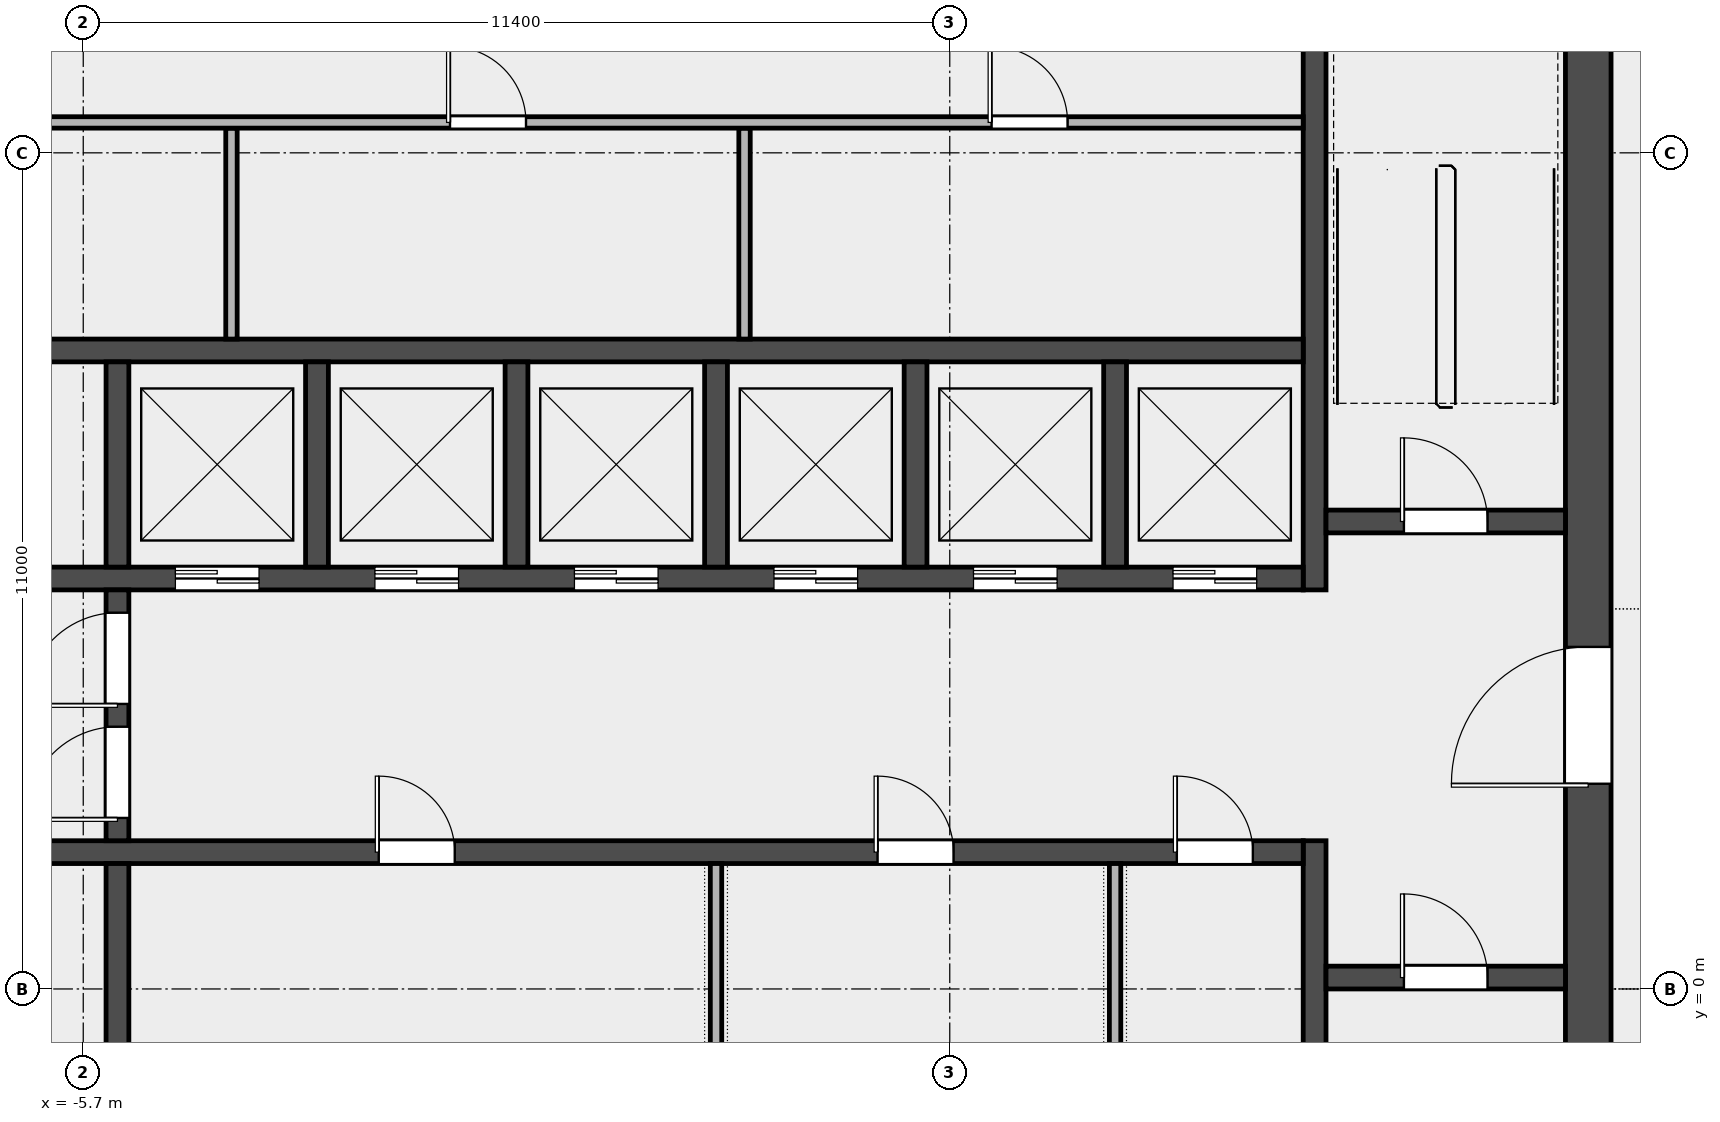
"""IFC4 building model, lengths in metres.
Left out: names, types, materials, properties, quantities, classifications, styles, units other than length and angle.
Written with IfcOpenShell. Run it as: python <this file> out.ifc"""

import sys

from ifc_helpers import new_model, si_unit, direction, frame, frame_2d, origin, place, context, subcontext, project, spatial, rectangle, extrude, element, fill, save


model = new_model("IFC4")
c1 = context("Model", 3, precision=1e-05, world=origin(), true_north=direction((0.0, 1.0)))
c2 = subcontext(c1, "Body", "Model", "MODEL_VIEW")
j1 = project(units=[si_unit("LENGTHUNIT", "METRE"), si_unit("PLANEANGLEUNIT", "RADIAN")], contexts=[c1])
p1 = place(None, origin())
s1 = spatial("IfcSite", under=j1, at=p1, CompositionType="ELEMENT")
p2 = place(p1, origin())
s2 = spatial("IfcBuilding", under=s1, at=p2, CompositionType="ELEMENT")
p3 = place(p2, frame((0.0, 0.0, 259.0)))
s3 = spatial("IfcBuildingStorey", under=s2, at=p3, CompositionType="ELEMENT", Elevation=259.0)
p4 = place(p3, frame((14.1, -6.6, 0.0), z_axis=(0.0, 0.0, 1.0), x_axis=(0.0, 1.0, 0.0)))
e1 = element("IfcWall", 1, at=p4, inside=s3, PredefinedType="SHEAR", context=c2, shape_type="SweptSolid", body=[
    extrude(rectangle(XDim=19.5, YDim=0.6, at=frame_2d((9.75, 0.0))), origin(), (0.0, 0.0, 1.0), 8.1),
])
p5 = place(p4, frame((9.3, 0.0, 0.0)))
e2 = element("IfcOpeningElement", 2, at=p5, cuts=e1, PredefinedType="OPENING", context=c2, shape_type="SweptSolid", body=[
    extrude(rectangle(XDim=1.8, YDim=2.1, at=frame_2d((0.9, 1.05))), frame((0.0, 0.312, 0.0), z_axis=(0.0, -1.0, 0.0), x_axis=(1.0, 0.0, 0.0)), (0.0, 0.0, 1.0), 0.624),
])
p6 = place(p3, frame((10.5, -6.6, 0.0), z_axis=(0.0, 0.0, 1.0), x_axis=(0.0, 1.0, 0.0)))
e3 = element("IfcWall", 3, at=p6, inside=s3, PredefinedType="SHEAR", context=c2, shape_type="SweptSolid", body=[
    extrude(rectangle(XDim=8.55, YDim=0.3, at=frame_2d((4.275, 0.0))), origin(), (0.0, 0.0, 1.0), 8.1),
])
p7 = place(p3, frame((10.5, 5.25, 0.0), z_axis=(0.0, 0.0, 1.0), x_axis=(0.0, 1.0, 0.0)))
e4 = element("IfcWall", 4, at=p7, inside=s3, PredefinedType="SHEAR", context=c2, shape_type="SweptSolid", body=[
    extrude(rectangle(XDim=7.65, YDim=0.3, at=frame_2d((3.825, 0.0))), origin(), (0.0, 0.0, 1.0), 8.1),
])
p8 = place(p3, frame((10.65, 0.15, 0.0), z_axis=(0.0, 0.0, 1.0), x_axis=(1.0, 0.0, 0.0)))
e5 = element("IfcWall", 5, at=p8, inside=s3, PredefinedType="SOLIDWALL", context=c2, shape_type="SweptSolid", body=[
    extrude(rectangle(XDim=3.15, YDim=0.3, at=frame_2d((1.575, 0.0))), origin(), (0.0, 0.0, 1.0), 8.1),
])
p9 = place(p8, frame((1.025, 0.0, 0.0)))
e6 = element("IfcOpeningElement", 6, at=p9, cuts=e5, PredefinedType="OPENING", context=c2, shape_type="SweptSolid", body=[
    extrude(rectangle(XDim=1.1, YDim=2.1, at=frame_2d((0.55, 1.05))), frame((0.0, 0.162, 0.0), z_axis=(0.0, -1.0, 0.0), x_axis=(1.0, 0.0, 0.0)), (0.0, 0.0, 1.0), 0.324),
])
p10 = place(p3, frame((10.65, 6.15, 0.0), z_axis=(0.0, 0.0, 1.0), x_axis=(1.0, 0.0, 0.0)))
e7 = element("IfcWall", 7, at=p10, inside=s3, PredefinedType="SOLIDWALL", context=c2, shape_type="SweptSolid", body=[
    extrude(rectangle(XDim=3.15, YDim=0.3, at=frame_2d((1.575, 0.0))), origin(), (0.0, 0.0, 1.0), 8.1),
])
p11 = place(p10, frame((1.025, 0.0, 0.0)))
e8 = element("IfcOpeningElement", 8, at=p11, cuts=e7, PredefinedType="OPENING", context=c2, shape_type="SweptSolid", body=[
    extrude(rectangle(XDim=1.1, YDim=2.1, at=frame_2d((0.55, 1.05))), frame((0.0, 0.162, 0.0), z_axis=(0.0, -1.0, 0.0), x_axis=(1.0, 0.0, 0.0)), (0.0, 0.0, 1.0), 0.324),
])
p12 = place(p3, frame((-10.35, 1.8, 0.0), z_axis=(0.0, 0.0, 1.0), x_axis=(1.0, 0.0, 0.0)))
e9 = element("IfcWall", 9, at=p12, inside=s3, PredefinedType="SOLIDWALL", context=c2, shape_type="SweptSolid", body=[
    extrude(rectangle(XDim=20.7, YDim=0.3, at=frame_2d((10.35, 0.0))), origin(), (0.0, 0.0, 1.0), 8.1),
])
p13 = place(p12, frame((0.512, 0.0, 0.0)))
e10 = element("IfcOpeningElement", 10, at=p13, cuts=e9, PredefinedType="OPENING", context=c2, shape_type="SweptSolid", body=[
    extrude(rectangle(XDim=1.3, YDim=2.1, at=frame_2d((0.65, 1.05))), frame((0.0, 0.162, 0.0), z_axis=(0.0, -1.0, 0.0), x_axis=(1.0, 0.0, 0.0)), (0.0, 0.0, 1.0), 0.324),
])
p14 = place(p12, frame((8.538, 0.0, 0.0)))
e11 = element("IfcOpeningElement", 11, at=p14, cuts=e9, PredefinedType="OPENING", context=c2, shape_type="SweptSolid", body=[
    extrude(rectangle(XDim=1.0, YDim=2.1, at=frame_2d((0.5, 1.05))), frame((0.0, 0.162, 0.0), z_axis=(0.0, -1.0, 0.0), x_axis=(1.0, 0.0, 0.0)), (0.0, 0.0, 1.0), 0.324),
])
p15 = place(p12, frame((15.1, 0.0, 0.0)))
e12 = element("IfcOpeningElement", 12, at=p15, cuts=e9, PredefinedType="OPENING", context=c2, shape_type="SweptSolid", body=[
    extrude(rectangle(XDim=1.0, YDim=2.1, at=frame_2d((0.5, 1.05))), frame((0.0, 0.162, 0.0), z_axis=(0.0, -1.0, 0.0), x_axis=(1.0, 0.0, 0.0)), (0.0, 0.0, 1.0), 0.324),
])
p16 = place(p12, frame((19.038, 0.0, 0.0)))
e13 = element("IfcOpeningElement", 13, at=p16, cuts=e9, PredefinedType="OPENING", context=c2, shape_type="SweptSolid", body=[
    extrude(rectangle(XDim=1.0, YDim=2.1, at=frame_2d((0.5, 1.05))), frame((0.0, 0.162, 0.0), z_axis=(0.0, -1.0, 0.0), x_axis=(1.0, 0.0, 0.0)), (0.0, 0.0, 1.0), 0.324),
])
p17 = place(p3, frame((-10.35, 5.4, 0.0), z_axis=(0.0, 0.0, 1.0), x_axis=(1.0, 0.0, 0.0)))
e14 = element("IfcWall", 14, at=p17, inside=s3, PredefinedType="SOLIDWALL", context=c2, shape_type="SweptSolid", body=[
    extrude(rectangle(XDim=20.7, YDim=0.3, at=frame_2d((10.35, 0.0))), origin(), (0.0, 0.0, 1.0), 8.1),
])
p18 = place(p17, frame((0.512, 0.0, 0.0)))
e15 = element("IfcOpeningElement", 15, at=p18, cuts=e14, PredefinedType="OPENING", context=c2, shape_type="SweptSolid", body=[
    extrude(rectangle(XDim=1.3, YDim=2.1, at=frame_2d((0.65, 1.05))), frame((0.0, 0.162, 0.0), z_axis=(0.0, -1.0, 0.0), x_axis=(1.0, 0.0, 0.0)), (0.0, 0.0, 1.0), 0.324),
])
p19 = place(p17, frame((5.863, 0.0, 0.0)))
e16 = element("IfcOpeningElement", 16, at=p19, cuts=e14, PredefinedType="OPENING", context=c2, shape_type="SweptSolid", body=[
    extrude(rectangle(XDim=1.1, YDim=2.1, at=frame_2d((0.55, 1.05))), frame((0.0, 0.162, 0.0), z_axis=(0.0, -1.0, 0.0), x_axis=(1.0, 0.0, 0.0)), (0.0, 0.0, 1.0), 0.324),
])
p20 = place(p17, frame((8.488, 0.0, 0.0)))
e17 = element("IfcOpeningElement", 17, at=p20, cuts=e14, PredefinedType="OPENING", context=c2, shape_type="SweptSolid", body=[
    extrude(rectangle(XDim=1.1, YDim=2.1, at=frame_2d((0.55, 1.05))), frame((0.0, 0.162, 0.0), z_axis=(0.0, -1.0, 0.0), x_axis=(1.0, 0.0, 0.0)), (0.0, 0.0, 1.0), 0.324),
])
p21 = place(p17, frame((11.113, 0.0, 0.0)))
e18 = element("IfcOpeningElement", 18, at=p21, cuts=e14, PredefinedType="OPENING", context=c2, shape_type="SweptSolid", body=[
    extrude(rectangle(XDim=1.1, YDim=2.1, at=frame_2d((0.55, 1.05))), frame((0.0, 0.162, 0.0), z_axis=(0.0, -1.0, 0.0), x_axis=(1.0, 0.0, 0.0)), (0.0, 0.0, 1.0), 0.324),
])
p22 = place(p17, frame((13.738, 0.0, 0.0)))
e19 = element("IfcOpeningElement", 19, at=p22, cuts=e14, PredefinedType="OPENING", context=c2, shape_type="SweptSolid", body=[
    extrude(rectangle(XDim=1.1, YDim=2.1, at=frame_2d((0.55, 1.05))), frame((0.0, 0.162, 0.0), z_axis=(0.0, -1.0, 0.0), x_axis=(1.0, 0.0, 0.0)), (0.0, 0.0, 1.0), 0.324),
])
p23 = place(p17, frame((16.363, 0.0, 0.0)))
e20 = element("IfcOpeningElement", 20, at=p23, cuts=e14, PredefinedType="OPENING", context=c2, shape_type="SweptSolid", body=[
    extrude(rectangle(XDim=1.1, YDim=2.1, at=frame_2d((0.55, 1.05))), frame((0.0, 0.162, 0.0), z_axis=(0.0, -1.0, 0.0), x_axis=(1.0, 0.0, 0.0)), (0.0, 0.0, 1.0), 0.324),
])
p24 = place(p17, frame((18.988, 0.0, 0.0)))
e21 = element("IfcOpeningElement", 21, at=p24, cuts=e14, PredefinedType="OPENING", context=c2, shape_type="SweptSolid", body=[
    extrude(rectangle(XDim=1.1, YDim=2.1, at=frame_2d((0.55, 1.05))), frame((0.0, 0.162, 0.0), z_axis=(0.0, -1.0, 0.0), x_axis=(1.0, 0.0, 0.0)), (0.0, 0.0, 1.0), 0.324),
])
p25 = place(p3, frame((-10.35, 8.4, 0.0), z_axis=(0.0, 0.0, 1.0), x_axis=(1.0, 0.0, 0.0)))
e22 = element("IfcWall", 22, at=p25, inside=s3, PredefinedType="SOLIDWALL", context=c2, shape_type="SweptSolid", body=[
    extrude(rectangle(XDim=20.7, YDim=0.3, at=frame_2d((10.35, 0.0))), origin(), (0.0, 0.0, 1.0), 8.1),
])
for number, where, z_axis, x_axis in (
    (23, (-5.25, -1.05, 0.0), (0.0, 0.0, 1.0), (0.0, 1.0, 0.0)),
    (24, (-5.25, 5.55, 0.0), (0.0, 0.0, 1.0), (0.0, 1.0, 0.0)),
    (25, (-2.625, 5.55, 0.0), (0.0, 0.0, 1.0), (0.0, 1.0, 0.0)),
    (26, (0.0, 5.55, 0.0), (0.0, 0.0, 1.0), (0.0, 1.0, 0.0)),
    (27, (2.625, 5.55, 0.0), (0.0, 0.0, 1.0), (0.0, 1.0, 0.0)),
    (28, (5.25, 5.55, 0.0), (0.0, 0.0, 1.0), (0.0, 1.0, 0.0)),
    (29, (7.875, 5.55, 0.0), (0.0, 0.0, 1.0), (0.0, 1.0, 0.0)),
):
    element("IfcWall", number, at=place(p3, frame(where, z_axis=z_axis, x_axis=x_axis)), inside=s3, PredefinedType="SOLIDWALL", context=c2, shape_type="SweptSolid", body=[
        extrude(rectangle(XDim=2.7, YDim=0.3, at=frame_2d((1.35, 0.0))), origin(), (0.0, 0.0, 1.0), 8.1),
    ])
p26 = place(p3, frame((-5.25, 1.95, 0.0), z_axis=(0.0, 0.0, 1.0), x_axis=(0.0, 1.0, 0.0)))
e30 = element("IfcWall", 30, at=p26, inside=s3, PredefinedType="SOLIDWALL", context=c2, shape_type="SweptSolid", body=[
    extrude(rectangle(XDim=3.3, YDim=0.3, at=frame_2d((1.65, 0.0))), origin(), (0.0, 0.0, 1.0), 8.1),
])
p27 = place(p26, frame((0.3, 0.0, 0.0)))
e31 = element("IfcOpeningElement", 31, at=p27, cuts=e30, PredefinedType="OPENING", context=c2, shape_type="SweptSolid", body=[
    extrude(rectangle(XDim=1.2, YDim=2.1, at=frame_2d((0.6, 1.05))), frame((0.0, 0.162, 0.0), z_axis=(0.0, -1.0, 0.0), x_axis=(1.0, 0.0, 0.0)), (0.0, 0.0, 1.0), 0.324),
])
p28 = place(p26, frame((1.8, 0.0, 0.0)))
e32 = element("IfcOpeningElement", 32, at=p28, cuts=e30, PredefinedType="OPENING", context=c2, shape_type="SweptSolid", body=[
    extrude(rectangle(XDim=1.2, YDim=2.1, at=frame_2d((0.6, 1.05))), frame((0.0, 0.162, 0.0), z_axis=(0.0, -1.0, 0.0), x_axis=(1.0, 0.0, 0.0)), (0.0, 0.0, 1.0), 0.324),
])
for number, where, z_axis, x_axis in (
    (33, (-3.75, 8.55, 0.0), (0.0, 0.0, 1.0), (0.0, 1.0, 0.0)),
    (34, (3.0, 8.55, 0.0), (0.0, 0.0, 1.0), (0.0, 1.0, 0.0)),
):
    element("IfcWall", number, at=place(p3, frame(where, z_axis=z_axis, x_axis=x_axis)), inside=s3, PredefinedType="PARTITIONING", context=c2, shape_type="SweptSolid", body=[
        extrude(rectangle(XDim=2.775, YDim=0.15, at=frame_2d((1.387, 0.0))), origin(), (0.0, 0.0, 1.0), 8.1),
    ])
p29 = place(p3, frame((-10.35, 11.4, 0.0), z_axis=(0.0, 0.0, 1.0), x_axis=(1.0, 0.0, 0.0)))
e35 = element("IfcWall", 35, at=p29, inside=s3, PredefinedType="PARTITIONING", context=c2, shape_type="SweptSolid", body=[
    extrude(rectangle(XDim=20.7, YDim=0.15, at=frame_2d((10.35, 0.0))), origin(), (0.0, 0.0, 1.0), 8.1),
])
p30 = place(p29, frame((2.725, 0.0, 0.0)))
e36 = element("IfcOpeningElement", 36, at=p30, cuts=e35, PredefinedType="OPENING", context=c2, shape_type="SweptSolid", body=[
    extrude(rectangle(XDim=1.0, YDim=2.1, at=frame_2d((0.5, 1.05))), frame((0.0, 0.087, 0.0), z_axis=(0.0, -1.0, 0.0), x_axis=(1.0, 0.0, 0.0)), (0.0, 0.0, 1.0), 0.174),
])
p31 = place(p29, frame((9.475, 0.0, 0.0)))
e37 = element("IfcOpeningElement", 37, at=p31, cuts=e35, PredefinedType="OPENING", context=c2, shape_type="SweptSolid", body=[
    extrude(rectangle(XDim=1.0, YDim=2.1, at=frame_2d((0.5, 1.05))), frame((0.0, 0.087, 0.0), z_axis=(0.0, -1.0, 0.0), x_axis=(1.0, 0.0, 0.0)), (0.0, 0.0, 1.0), 0.174),
])
p32 = place(p29, frame((16.6, 0.0, 0.0)))
e38 = element("IfcOpeningElement", 38, at=p32, cuts=e35, PredefinedType="OPENING", context=c2, shape_type="SweptSolid", body=[
    extrude(rectangle(XDim=1.0, YDim=2.1, at=frame_2d((0.5, 1.05))), frame((0.0, 0.087, 0.0), z_axis=(0.0, -1.0, 0.0), x_axis=(1.0, 0.0, 0.0)), (0.0, 0.0, 1.0), 0.174),
])
for number, where, z_axis, x_axis in (
    (39, (2.625, -1.05, 0.0), (0.0, 0.0, 1.0), (0.0, 1.0, 0.0)),
    (40, (7.875, -1.05, 0.0), (0.0, 0.0, 1.0), (0.0, 1.0, 0.0)),
):
    element("IfcWall", number, at=place(p3, frame(where, z_axis=z_axis, x_axis=x_axis)), inside=s3, PredefinedType="PARTITIONING", context=c2, shape_type="SweptSolid", body=[
        extrude(rectangle(XDim=2.7, YDim=0.15, at=frame_2d((1.35, 0.0))), origin(), (0.0, 0.0, 1.0), 8.1),
    ])
p33 = place(p9, origin())
e41 = element("IfcDoor", 41, at=p33, inside=s3, OperationType="SINGLE_SWING_RIGHT", PredefinedType="DOOR", context=c2, shape_type="SweptSolid", body=[
    extrude(rectangle(XDim=1.1, YDim=2.1, at=frame_2d((0.55, 1.05))), frame((0.0, 0.025, 0.0), z_axis=(0.0, -1.0, 0.0), x_axis=(1.0, 0.0, 0.0)), (0.0, 0.0, 1.0), 0.05),
])
fill(e6, e41)
p34 = place(p11, origin())
e42 = element("IfcDoor", 42, at=p34, inside=s3, OperationType="SINGLE_SWING_RIGHT", PredefinedType="DOOR", context=c2, shape_type="SweptSolid", body=[
    extrude(rectangle(XDim=1.1, YDim=2.1, at=frame_2d((0.55, 1.05))), frame((0.0, 0.025, 0.0), z_axis=(0.0, -1.0, 0.0), x_axis=(1.0, 0.0, 0.0)), (0.0, 0.0, 1.0), 0.05),
])
fill(e8, e42)
p35 = place(p5, origin())
e43 = element("IfcDoor", 43, at=p35, inside=s3, OperationType="DOUBLE_DOOR_SINGLE_SWING", PredefinedType="DOOR", context=c2, shape_type="SweptSolid", body=[
    extrude(rectangle(XDim=1.8, YDim=2.1, at=frame_2d((0.9, 1.05))), frame((0.0, 0.025, 0.0), z_axis=(0.0, -1.0, 0.0), x_axis=(1.0, 0.0, 0.0)), (0.0, 0.0, 1.0), 0.05),
])
fill(e2, e43)
p36 = place(p27, origin())
e44 = element("IfcDoor", 44, at=p36, inside=s3, OperationType="SINGLE_SWING_LEFT", PredefinedType="DOOR", context=c2, shape_type="SweptSolid", body=[
    extrude(rectangle(XDim=1.2, YDim=2.1, at=frame_2d((0.6, 1.05))), frame((0.0, 0.025, 0.0), z_axis=(0.0, -1.0, 0.0), x_axis=(1.0, 0.0, 0.0)), (0.0, 0.0, 1.0), 0.05),
])
fill(e31, e44)
p37 = place(p28, origin())
e45 = element("IfcDoor", 45, at=p37, inside=s3, OperationType="SINGLE_SWING_RIGHT", PredefinedType="DOOR", context=c2, shape_type="SweptSolid", body=[
    extrude(rectangle(XDim=1.2, YDim=2.1, at=frame_2d((0.6, 1.05))), frame((0.0, 0.025, 0.0), z_axis=(0.0, -1.0, 0.0), x_axis=(1.0, 0.0, 0.0)), (0.0, 0.0, 1.0), 0.05),
])
fill(e32, e45)
p38 = place(p19, origin())
e46 = element("IfcDoor", 46, at=p38, inside=s3, OperationType="DOUBLE_DOOR_SLIDING", PredefinedType="DOOR", context=c2, shape_type="SweptSolid", body=[
    extrude(rectangle(XDim=1.1, YDim=2.1, at=frame_2d((0.55, 1.05))), frame((0.0, 0.025, 0.0), z_axis=(0.0, -1.0, 0.0), x_axis=(1.0, 0.0, 0.0)), (0.0, 0.0, 1.0), 0.05),
])
fill(e16, e46)
p39 = place(p20, origin())
e47 = element("IfcDoor", 47, at=p39, inside=s3, OperationType="DOUBLE_DOOR_SLIDING", PredefinedType="DOOR", context=c2, shape_type="SweptSolid", body=[
    extrude(rectangle(XDim=1.1, YDim=2.1, at=frame_2d((0.55, 1.05))), frame((0.0, 0.025, 0.0), z_axis=(0.0, -1.0, 0.0), x_axis=(1.0, 0.0, 0.0)), (0.0, 0.0, 1.0), 0.05),
])
fill(e17, e47)
p40 = place(p21, origin())
e48 = element("IfcDoor", 48, at=p40, inside=s3, OperationType="DOUBLE_DOOR_SLIDING", PredefinedType="DOOR", context=c2, shape_type="SweptSolid", body=[
    extrude(rectangle(XDim=1.1, YDim=2.1, at=frame_2d((0.55, 1.05))), frame((0.0, 0.025, 0.0), z_axis=(0.0, -1.0, 0.0), x_axis=(1.0, 0.0, 0.0)), (0.0, 0.0, 1.0), 0.05),
])
fill(e18, e48)
p41 = place(p22, origin())
e49 = element("IfcDoor", 49, at=p41, inside=s3, OperationType="DOUBLE_DOOR_SLIDING", PredefinedType="DOOR", context=c2, shape_type="SweptSolid", body=[
    extrude(rectangle(XDim=1.1, YDim=2.1, at=frame_2d((0.55, 1.05))), frame((0.0, 0.025, 0.0), z_axis=(0.0, -1.0, 0.0), x_axis=(1.0, 0.0, 0.0)), (0.0, 0.0, 1.0), 0.05),
])
fill(e19, e49)
p42 = place(p23, origin())
e50 = element("IfcDoor", 50, at=p42, inside=s3, OperationType="DOUBLE_DOOR_SLIDING", PredefinedType="DOOR", context=c2, shape_type="SweptSolid", body=[
    extrude(rectangle(XDim=1.1, YDim=2.1, at=frame_2d((0.55, 1.05))), frame((0.0, 0.025, 0.0), z_axis=(0.0, -1.0, 0.0), x_axis=(1.0, 0.0, 0.0)), (0.0, 0.0, 1.0), 0.05),
])
fill(e20, e50)
p43 = place(p24, origin())
e51 = element("IfcDoor", 51, at=p43, inside=s3, OperationType="DOUBLE_DOOR_SLIDING", PredefinedType="DOOR", context=c2, shape_type="SweptSolid", body=[
    extrude(rectangle(XDim=1.1, YDim=2.1, at=frame_2d((0.55, 1.05))), frame((0.0, 0.025, 0.0), z_axis=(0.0, -1.0, 0.0), x_axis=(1.0, 0.0, 0.0)), (0.0, 0.0, 1.0), 0.05),
])
fill(e21, e51)
p44 = place(p31, origin())
e52 = element("IfcDoor", 52, at=p44, inside=s3, OperationType="SINGLE_SWING_LEFT", PredefinedType="DOOR", context=c2, shape_type="SweptSolid", body=[
    extrude(rectangle(XDim=1.0, YDim=2.1, at=frame_2d((0.5, 1.05))), frame((0.0, 0.025, 0.0), z_axis=(0.0, -1.0, 0.0), x_axis=(1.0, 0.0, 0.0)), (0.0, 0.0, 1.0), 0.05),
])
fill(e37, e52)
p45 = place(p32, origin())
e53 = element("IfcDoor", 53, at=p45, inside=s3, OperationType="SINGLE_SWING_LEFT", PredefinedType="DOOR", context=c2, shape_type="SweptSolid", body=[
    extrude(rectangle(XDim=1.0, YDim=2.1, at=frame_2d((0.5, 1.05))), frame((0.0, 0.025, 0.0), z_axis=(0.0, -1.0, 0.0), x_axis=(1.0, 0.0, 0.0)), (0.0, 0.0, 1.0), 0.05),
])
fill(e38, e53)
p46 = place(p14, origin())
e54 = element("IfcDoor", 54, at=p46, inside=s3, OperationType="SINGLE_SWING_LEFT", PredefinedType="DOOR", context=c2, shape_type="SweptSolid", body=[
    extrude(rectangle(XDim=1.0, YDim=2.1, at=frame_2d((0.5, 1.05))), frame((0.0, 0.025, 0.0), z_axis=(0.0, -1.0, 0.0), x_axis=(1.0, 0.0, 0.0)), (0.0, 0.0, 1.0), 0.05),
])
fill(e11, e54)
p47 = place(p15, origin())
e55 = element("IfcDoor", 55, at=p47, inside=s3, OperationType="SINGLE_SWING_LEFT", PredefinedType="DOOR", context=c2, shape_type="SweptSolid", body=[
    extrude(rectangle(XDim=1.0, YDim=2.1, at=frame_2d((0.5, 1.05))), frame((0.0, 0.025, 0.0), z_axis=(0.0, -1.0, 0.0), x_axis=(1.0, 0.0, 0.0)), (0.0, 0.0, 1.0), 0.05),
])
fill(e12, e55)
p48 = place(p16, origin())
e56 = element("IfcDoor", 56, at=p48, inside=s3, OperationType="SINGLE_SWING_LEFT", PredefinedType="DOOR", context=c2, shape_type="SweptSolid", body=[
    extrude(rectangle(XDim=1.0, YDim=2.1, at=frame_2d((0.5, 1.05))), frame((0.0, 0.025, 0.0), z_axis=(0.0, -1.0, 0.0), x_axis=(1.0, 0.0, 0.0)), (0.0, 0.0, 1.0), 0.05),
])
fill(e13, e56)
save(model, sys.argv[1])
